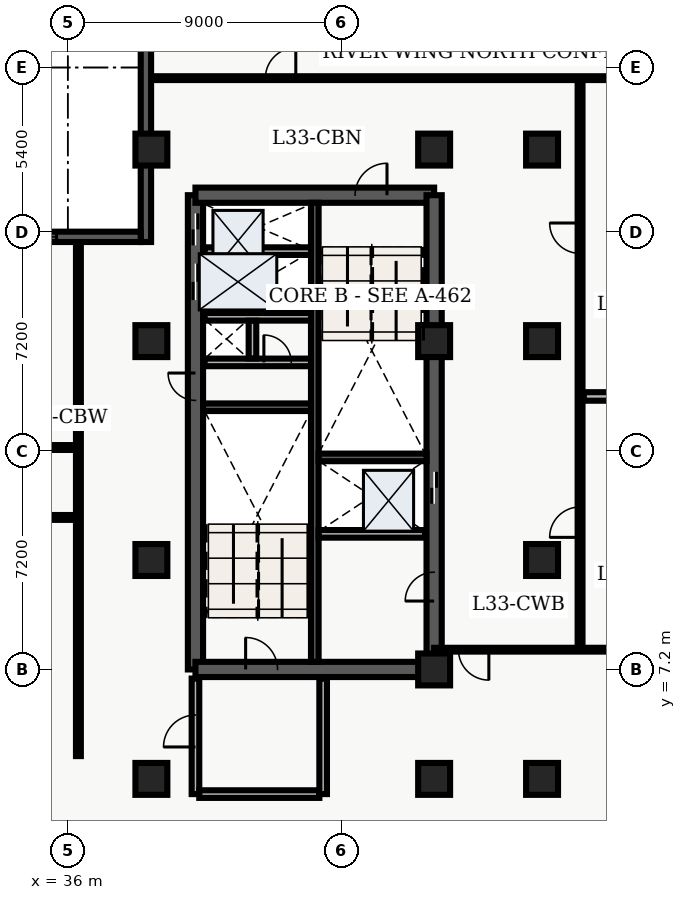
"""IFC4 building model, lengths in metres.
Left out: names, types, materials, properties, quantities, classifications, styles, units other than length and angle.
Written with IfcOpenShell. Run it as: python <this file> out.ifc"""

import sys

from ifc_helpers import new_model, entity, si_unit, converted_unit, direction, frame, origin_with_axes, origin_2d_with_axis, place, context, subcontext, project, spatial, polyline, rectangle, outline, extrude, element, fill, save


model = new_model("IFC4")
c1 = context("Model", 3, precision=1e-05, world=origin_with_axes(), true_north=direction((0.0, 1.0)))
c2 = subcontext(c1, "Body", "Model", "MODEL_VIEW")
j1 = project(units=[si_unit("LENGTHUNIT", "METRE"), converted_unit("PLANEANGLEUNIT", "DEGREE", entity("IfcPlaneAngleMeasure", 0.017), si_unit("PLANEANGLEUNIT", "RADIAN"), dimensions=[0, 0, 0, 0, 0, 0, 0])], contexts=[c1])
p1 = place(None, origin_with_axes())
s1 = spatial("IfcSite", under=j1, at=p1, CompositionType="ELEMENT")
p2 = place(p1, origin_with_axes())
s2 = spatial("IfcBuilding", under=s1, at=p2, CompositionType="ELEMENT")
p3 = place(p2, frame((0.0, 0.0, 136.8), z_axis=(0.0, 0.0, 1.0), x_axis=(1.0, 0.0, 0.0)))
s3 = spatial("IfcBuildingStorey", under=s2, at=p3, CompositionType="ELEMENT", Elevation=136.8)
p4 = place(p3, frame((40.2, 7.2, 0.0), z_axis=(0.0, 0.0, 1.0), x_axis=(0.0, 1.0, 0.0)))
e1 = element("IfcWall", 1, at=p4, inside=s3, PredefinedType="SHEAR", context=c2, shape_type="SweptSolid", body=[
    extrude(outline(polyline([(0.0, -0.25), (15.6, -0.25), (15.6, 0.25), (0.0, 0.25), (0.0, -0.25)])), origin_with_axes(), (0.0, 0.0, 1.0), 3.66),
])
p5 = place(p4, frame((14.475, 0.0, 0.0), z_axis=(0.0, 0.0, 1.0), x_axis=(1.0, 0.0, 0.0)))
e2 = element("IfcOpeningElement", 2, at=p5, cuts=e1, PredefinedType="OPENING", context=c2, shape_type="SweptSolid", body=[
    extrude(rectangle(XDim=1.05, YDim=0.52, at=origin_2d_with_axis()), origin_with_axes(), (0.0, 0.0, 1.0), 2.15),
])
p6 = place(p4, frame((12.75, 0.0, 0.0), z_axis=(0.0, 0.0, 1.0), x_axis=(1.0, 0.0, 0.0)))
e3 = element("IfcOpeningElement", 3, at=p6, cuts=e1, PredefinedType="OPENING", context=c2, shape_type="SweptSolid", body=[
    extrude(rectangle(XDim=1.2, YDim=0.52, at=origin_2d_with_axis()), origin_with_axes(), (0.0, 0.0, 1.0), 2.15),
])
p7 = place(p4, frame((9.3, 0.0, 0.0), z_axis=(0.0, 0.0, 1.0), x_axis=(1.0, 0.0, 0.0)))
e4 = element("IfcOpeningElement", 4, at=p7, cuts=e1, PredefinedType="OPENING", context=c2, shape_type="SweptSolid", body=[
    extrude(rectangle(XDim=0.9, YDim=0.52, at=origin_2d_with_axis()), origin_with_axes(), (0.0, 0.0, 1.0), 2.15),
])
p8 = place(p3, frame((40.2, 7.2, 0.0), z_axis=(0.0, 0.0, 1.0), x_axis=(1.0, 0.0, 0.0)))
e5 = element("IfcWall", 5, at=p8, inside=s3, PredefinedType="SHEAR", context=c2, shape_type="SweptSolid", body=[
    extrude(outline(polyline([(0.0, -0.25), (7.85, -0.25), (7.85, 0.25), (0.0, 0.25), (0.0, -0.25)])), origin_with_axes(), (0.0, 0.0, 1.0), 3.66),
])
p9 = place(p8, frame((2.175, 0.0, 0.0), z_axis=(0.0, 0.0, 1.0), x_axis=(1.0, 0.0, 0.0)))
e6 = element("IfcOpeningElement", 6, at=p9, cuts=e5, PredefinedType="OPENING", context=c2, shape_type="SweptSolid", body=[
    extrude(rectangle(XDim=1.05, YDim=0.52, at=origin_2d_with_axis()), origin_with_axes(), (0.0, 0.0, 1.0), 2.15),
])
p10 = place(p3, frame((40.2, 22.8, 0.0), z_axis=(0.0, 0.0, 1.0), x_axis=(1.0, 0.0, 0.0)))
e7 = element("IfcWall", 7, at=p10, inside=s3, PredefinedType="SHEAR", context=c2, shape_type="SweptSolid", body=[
    extrude(outline(polyline([(0.0, -0.25), (7.85, -0.25), (7.85, 0.25), (0.0, 0.25), (0.0, -0.25)])), origin_with_axes(), (0.0, 0.0, 1.0), 3.66),
])
p11 = place(p10, frame((5.775, 0.0, 0.0), z_axis=(0.0, 0.0, 1.0), x_axis=(1.0, 0.0, 0.0)))
e8 = element("IfcOpeningElement", 8, at=p11, cuts=e7, PredefinedType="OPENING", context=c2, shape_type="SweptSolid", body=[
    extrude(rectangle(XDim=1.05, YDim=0.52, at=origin_2d_with_axis()), origin_with_axes(), (0.0, 0.0, 1.0), 2.15),
])
p12 = place(p3, frame((48.05, 7.2, 0.0), z_axis=(0.0, 0.0, 1.0), x_axis=(0.0, 1.0, 0.0)))
e9 = element("IfcWall", 9, at=p12, inside=s3, PredefinedType="SHEAR", context=c2, shape_type="SweptSolid", body=[
    extrude(outline(polyline([(0.0, -0.25), (15.6, -0.25), (15.6, 0.25), (0.0, 0.25), (0.0, -0.25)])), origin_with_axes(), (0.0, 0.0, 1.0), 3.66),
])
p13 = place(p12, frame((5.975, 0.0, 0.0), z_axis=(0.0, 0.0, 1.0), x_axis=(1.0, 0.0, 0.0)))
e10 = element("IfcOpeningElement", 10, at=p13, cuts=e9, PredefinedType="OPENING", context=c2, shape_type="SweptSolid", body=[
    extrude(rectangle(XDim=1.05, YDim=0.52, at=origin_2d_with_axis()), origin_with_axes(), (0.0, 0.0, 1.0), 2.15),
])
p14 = place(p12, frame((2.725, 0.0, 0.0), z_axis=(0.0, 0.0, 1.0), x_axis=(1.0, 0.0, 0.0)))
e11 = element("IfcOpeningElement", 11, at=p14, cuts=e9, PredefinedType="OPENING", context=c2, shape_type="SweptSolid", body=[
    extrude(rectangle(XDim=0.95, YDim=0.52, at=origin_2d_with_axis()), origin_with_axes(), (0.0, 0.0, 1.0), 2.15),
])
p15 = place(p3, frame((44.125, 7.45, 0.0), z_axis=(0.0, 0.0, 1.0), x_axis=(0.0, 1.0, 0.0)))
e12 = element("IfcWall", 12, at=p15, inside=s3, PredefinedType="SHEAR", context=c2, shape_type="SweptSolid", body=[
    extrude(outline(polyline([(0.0, -0.125), (15.1, -0.125), (15.1, 0.125), (0.0, 0.125), (0.0, -0.125)])), origin_with_axes(), (0.0, 0.0, 1.0), 3.66),
])
for number, where, z_axis, x_axis in (
    (13, (40.45, 15.825, 0.0), (0.0, 0.0, 1.0), (1.0, 0.0, 0.0)),
    (14, (44.25, 14.175, 0.0), (0.0, 0.0, 1.0), (1.0, 0.0, 0.0)),
):
    element("IfcWall", number, at=place(p3, frame(where, z_axis=z_axis, x_axis=x_axis)), inside=s3, PredefinedType="SHEAR", context=c2, shape_type="SweptSolid", body=[
        extrude(outline(polyline([(0.0, -0.125), (3.55, -0.125), (3.55, 0.125), (0.0, 0.125), (0.0, -0.125)])), origin_with_axes(), (0.0, 0.0, 1.0), 3.66),
    ])
p16 = place(p3, frame((40.5, 17.3, 0.0), z_axis=(0.0, 0.0, 1.0), x_axis=(1.0, 0.0, 0.0)))
e15 = element("IfcWall", 15, at=p16, inside=s3, PredefinedType="SOLIDWALL", context=c2, shape_type="SweptSolid", body=[
    extrude(outline(polyline([(0.0, -0.125), (3.5, -0.125), (3.5, 0.125), (0.0, 0.125), (0.0, -0.125)])), origin_with_axes(), (0.0, 0.0, 1.0), 2.7),
])
p17 = place(p16, frame((2.4, 0.0, 0.0), z_axis=(0.0, 0.0, 1.0), x_axis=(1.0, 0.0, 0.0)))
e16 = element("IfcOpeningElement", 16, at=p17, cuts=e15, PredefinedType="OPENING", context=c2, shape_type="SweptSolid", body=[
    extrude(rectangle(XDim=0.9, YDim=0.27, at=origin_2d_with_axis()), origin_with_axes(), (0.0, 0.0, 1.0), 2.15),
])
p18 = place(p3, frame((40.5, 18.8, 0.0), z_axis=(0.0, 0.0, 1.0), x_axis=(1.0, 0.0, 0.0)))
e17 = element("IfcWall", 17, at=p18, inside=s3, PredefinedType="SOLIDWALL", context=c2, shape_type="SweptSolid", body=[
    extrude(outline(polyline([(0.0, -0.125), (3.5, -0.125), (3.5, 0.125), (0.0, 0.125), (0.0, -0.125)])), origin_with_axes(), (0.0, 0.0, 1.0), 2.7),
])
p19 = place(p3, frame((42.075, 17.43, 0.0), z_axis=(0.0, 0.0, 1.0), x_axis=(0.0, 1.0, 0.0)))
e18 = element("IfcWall", 18, at=p19, inside=s3, PredefinedType="SOLIDWALL", context=c2, shape_type="SweptSolid", body=[
    extrude(outline(polyline([(0.0, -0.125), (1.24, -0.125), (1.24, 0.125), (0.0, 0.125), (0.0, -0.125)])), origin_with_axes(), (0.0, 0.0, 1.0), 2.7),
])
p20 = place(p3, frame((40.2, 3.1, 0.0), z_axis=(0.0, 0.0, 1.0), x_axis=(0.0, 1.0, 0.0)))
e19 = element("IfcWall", 19, at=p20, inside=s3, PredefinedType="SOLIDWALL", context=c2, shape_type="SweptSolid", body=[
    extrude(outline(polyline([(0.0, -0.125), (3.8, -0.125), (3.8, 0.125), (0.0, 0.125), (0.0, -0.125)])), origin_with_axes(), (0.0, 0.0, 1.0), 2.7),
])
p21 = place(p20, frame((2.075, 0.0, 0.0), z_axis=(0.0, 0.0, 1.0), x_axis=(1.0, 0.0, 0.0)))
e20 = element("IfcOpeningElement", 20, at=p21, cuts=e19, PredefinedType="OPENING", context=c2, shape_type="SweptSolid", body=[
    extrude(rectangle(XDim=1.05, YDim=0.27, at=origin_2d_with_axis()), origin_with_axes(), (0.0, 0.0, 1.0), 2.15),
])
p22 = place(p3, frame((40.325, 3.1, 0.0), z_axis=(0.0, 0.0, 1.0), x_axis=(1.0, 0.0, 0.0)))
e21 = element("IfcWall", 21, at=p22, inside=s3, PredefinedType="SOLIDWALL", context=c2, shape_type="SweptSolid", body=[
    extrude(outline(polyline([(0.0, -0.125), (3.95, -0.125), (3.95, 0.125), (0.0, 0.125), (0.0, -0.125)])), origin_with_axes(), (0.0, 0.0, 1.0), 2.7),
])
p23 = place(p3, frame((44.4, 3.1, 0.0), z_axis=(0.0, 0.0, 1.0), x_axis=(0.0, 1.0, 0.0)))
e22 = element("IfcWall", 22, at=p23, inside=s3, PredefinedType="SOLIDWALL", context=c2, shape_type="SweptSolid", body=[
    extrude(outline(polyline([(0.0, -0.125), (3.8, -0.125), (3.8, 0.125), (0.0, 0.125), (0.0, -0.125)])), origin_with_axes(), (0.0, 0.0, 1.0), 2.7),
])
for number, where, z_axis, x_axis in (
    (23, (38.75, 3.6, 0.0), (0.0, 0.0, 1.0), (1.0, 0.0, 0.0)),
    (24, (38.75, 10.8, 0.0), (0.0, 0.0, 1.0), (1.0, 0.0, 0.0)),
    (25, (38.75, 18.0, 0.0), (0.0, 0.0, 1.0), (1.0, 0.0, 0.0)),
    (26, (38.75, 24.3, 0.0), (0.0, 0.0, 1.0), (1.0, 0.0, 0.0)),
    (27, (48.05, 3.6, 0.0), (0.0, 0.0, 1.0), (1.0, 0.0, 0.0)),
    (28, (48.05, 7.2, 0.0), (0.0, 0.0, 1.0), (1.0, 0.0, 0.0)),
    (29, (48.05, 18.0, 0.0), (0.0, 0.0, 1.0), (1.0, 0.0, 0.0)),
    (30, (48.05, 24.3, 0.0), (0.0, 0.0, 1.0), (1.0, 0.0, 0.0)),
    (31, (51.6, 3.6, 0.0), (0.0, 0.0, 1.0), (1.0, 0.0, 0.0)),
    (32, (51.6, 10.8, 0.0), (0.0, 0.0, 1.0), (1.0, 0.0, 0.0)),
    (33, (51.6, 18.0, 0.0), (0.0, 0.0, 1.0), (1.0, 0.0, 0.0)),
    (34, (51.6, 24.3, 0.0), (0.0, 0.0, 1.0), (1.0, 0.0, 0.0)),
):
    element("IfcColumn", number, at=place(p3, frame(where, z_axis=z_axis, x_axis=x_axis)), inside=s3, PredefinedType="COLUMN", context=c2, shape_type="SweptSolid", body=[
        extrude(rectangle(XDim=1.05, YDim=1.05, at=origin_2d_with_axis()), origin_with_axes(), (0.0, 0.0, 1.0), 3.9),
    ])
for number, where, z_axis, x_axis in (
    (35, (40.5, 20.96, 0.0), (0.0, 0.0, 1.0), (1.0, 0.0, 0.0)),
    (36, (44.25, 11.66, 0.0), (0.0, 0.0, 1.0), (1.0, 0.0, 0.0)),
):
    element("IfcWall", number, at=place(p3, frame(where, z_axis=z_axis, x_axis=x_axis)), inside=s3, PredefinedType="SOLIDWALL", context=c2, shape_type="SweptSolid", body=[
        extrude(outline(polyline([(0.0, -0.125), (3.5, -0.125), (3.5, 0.125), (0.0, 0.125), (0.0, -0.125)])), origin_with_axes(), (0.0, 0.0, 1.0), 2.7),
    ])
p24 = place(p3, frame((21.15, 12.2, 0.0), z_axis=(0.0, 0.0, 1.0), x_axis=(1.0, 0.0, 0.0)))
e37 = element("IfcWall", 37, at=p24, inside=s3, PredefinedType="PARTITIONING", context=c2, shape_type="SweptSolid", body=[
    extrude(outline(polyline([(0.0, -0.08), (15.2, -0.08), (15.2, 0.08), (0.0, 0.08), (0.0, -0.08)])), origin_with_axes(), (0.0, 0.0, 1.0), 2.7),
])
p25 = place(p24, frame((3.315, 0.0, 0.0), z_axis=(0.0, 0.0, 1.0), x_axis=(1.0, 0.0, 0.0)))
e38 = element("IfcOpeningElement", 38, at=p25, cuts=e37, PredefinedType="OPENING", context=c2, shape_type="SweptSolid", body=[
    extrude(rectangle(XDim=1.0, YDim=0.18, at=origin_2d_with_axis()), origin_with_axes(), (0.0, 0.0, 1.0), 2.15),
])
p26 = place(p24, frame((7.624, 0.0, 0.0), z_axis=(0.0, 0.0, 1.0), x_axis=(1.0, 0.0, 0.0)))
e39 = element("IfcOpeningElement", 39, at=p26, cuts=e37, PredefinedType="OPENING", context=c2, shape_type="SweptSolid", body=[
    extrude(rectangle(XDim=1.0, YDim=0.18, at=origin_2d_with_axis()), origin_with_axes(), (0.0, 0.0, 1.0), 2.15),
])
p27 = place(p24, frame((10.288, 0.0, 0.0), z_axis=(0.0, 0.0, 1.0), x_axis=(1.0, 0.0, 0.0)))
e40 = element("IfcOpeningElement", 40, at=p27, cuts=e37, PredefinedType="OPENING", context=c2, shape_type="SweptSolid", body=[
    extrude(rectangle(XDim=1.0, YDim=0.18, at=origin_2d_with_axis()), origin_with_axes(), (0.0, 0.0, 1.0), 2.15),
])
p28 = place(p24, frame((13.169, 0.0, 0.0), z_axis=(0.0, 0.0, 1.0), x_axis=(1.0, 0.0, 0.0)))
e41 = element("IfcOpeningElement", 41, at=p28, cuts=e37, PredefinedType="OPENING", context=c2, shape_type="SweptSolid", body=[
    extrude(rectangle(XDim=1.0, YDim=0.18, at=origin_2d_with_axis()), origin_with_axes(), (0.0, 0.0, 1.0), 2.15),
])
p29 = place(p3, frame((21.15, 14.5, 0.0), z_axis=(0.0, 0.0, 1.0), x_axis=(1.0, 0.0, 0.0)))
e42 = element("IfcWall", 42, at=p29, inside=s3, PredefinedType="PARTITIONING", context=c2, shape_type="SweptSolid", body=[
    extrude(outline(polyline([(0.0, -0.08), (15.2, -0.08), (15.2, 0.08), (0.0, 0.08), (0.0, -0.08)])), origin_with_axes(), (0.0, 0.0, 1.0), 2.7),
])
p30 = place(p29, frame((7.65, 0.0, 0.0), z_axis=(0.0, 0.0, 1.0), x_axis=(1.0, 0.0, 0.0)))
e43 = element("IfcOpeningElement", 43, at=p30, cuts=e42, PredefinedType="OPENING", context=c2, shape_type="SweptSolid", body=[
    extrude(rectangle(XDim=1.2, YDim=0.18, at=origin_2d_with_axis()), origin_with_axes(), (0.0, 0.0, 1.0), 2.2),
])
p31 = place(p3, frame((36.35, 4.35, 0.0), z_axis=(0.0, 0.0, 1.0), x_axis=(0.0, 1.0, 0.0)))
e44 = element("IfcWall", 44, at=p31, inside=s3, PredefinedType="PARTITIONING", context=c2, shape_type="SweptSolid", body=[
    extrude(outline(polyline([(0.0, -0.08), (16.95, -0.08), (16.95, 0.08), (0.0, 0.08), (0.0, -0.08)])), origin_with_axes(), (0.0, 0.0, 1.0), 2.7),
])
p32 = place(p3, frame((52.85, 7.85, 0.0), z_axis=(0.0, 0.0, 1.0), x_axis=(0.0, 1.0, 0.0)))
e45 = element("IfcWall", 45, at=p32, inside=s3, PredefinedType="PARTITIONING", context=c2, shape_type="SweptSolid", body=[
    extrude(outline(polyline([(0.0, -0.08), (18.8, -0.08), (18.8, 0.08), (0.0, 0.08), (0.0, -0.08)])), origin_with_axes(), (0.0, 0.0, 1.0), 2.7),
])
p33 = place(p32, frame((4.195, 0.0, 0.0), z_axis=(0.0, 0.0, 1.0), x_axis=(1.0, 0.0, 0.0)))
e46 = element("IfcOpeningElement", 46, at=p33, cuts=e45, PredefinedType="OPENING", context=c2, shape_type="SweptSolid", body=[
    extrude(rectangle(XDim=1.0, YDim=0.18, at=origin_2d_with_axis()), origin_with_axes(), (0.0, 0.0, 1.0), 2.15),
])
p34 = place(p32, frame((13.535, 0.0, 0.0), z_axis=(0.0, 0.0, 1.0), x_axis=(1.0, 0.0, 0.0)))
e47 = element("IfcOpeningElement", 47, at=p34, cuts=e45, PredefinedType="OPENING", context=c2, shape_type="SweptSolid", body=[
    extrude(rectangle(XDim=1.0, YDim=0.18, at=origin_2d_with_axis()), origin_with_axes(), (0.0, 0.0, 1.0), 2.15),
])
p35 = place(p3, frame((59.665, 7.85, 0.0), z_axis=(0.0, 0.0, 1.0), x_axis=(-1.0, 0.0, 0.0)))
e48 = element("IfcWall", 48, at=p35, inside=s3, PredefinedType="PARTITIONING", context=c2, shape_type="SweptSolid", body=[
    extrude(outline(polyline([(0.0, -0.062), (11.615, -0.062), (11.615, 0.062), (0.0, 0.062), (0.0, -0.062)])), origin_with_axes(), (0.0, 0.0, 1.0), 2.7),
])
p36 = place(p35, frame((10.315, 0.0, 0.0), z_axis=(0.0, 0.0, 1.0), x_axis=(1.0, 0.0, 0.0)))
e49 = element("IfcOpeningElement", 49, at=p36, cuts=e48, PredefinedType="OPENING", context=c2, shape_type="SweptSolid", body=[
    extrude(rectangle(XDim=1.0, YDim=0.145, at=origin_2d_with_axis()), origin_with_axes(), (0.0, 0.0, 1.0), 2.15),
])
p37 = place(p3, frame((38.735, 26.65, 0.0), z_axis=(0.0, 0.0, 1.0), x_axis=(1.0, 0.0, 0.0)))
e50 = element("IfcWall", 50, at=p37, inside=s3, PredefinedType="PARTITIONING", context=c2, shape_type="SweptSolid", body=[
    extrude(outline(polyline([(0.0, -0.062), (20.905, -0.062), (20.905, 0.062), (0.0, 0.062), (0.0, -0.062)])), origin_with_axes(), (0.0, 0.0, 1.0), 2.7),
])
p38 = place(p37, frame((4.265, 0.0, 0.0), z_axis=(0.0, 0.0, 1.0), x_axis=(1.0, 0.0, 0.0)))
e51 = element("IfcOpeningElement", 51, at=p38, cuts=e50, PredefinedType="OPENING", context=c2, shape_type="SweptSolid", body=[
    extrude(rectangle(XDim=1.0, YDim=0.145, at=origin_2d_with_axis()), origin_with_axes(), (0.0, 0.0, 1.0), 2.15),
])
p39 = place(p3, frame((52.97, 16.18, 0.0), z_axis=(0.0, 0.0, 1.0), x_axis=(1.0, 0.0, 0.0)))
e52 = element("IfcWall", 52, at=p39, inside=s3, PredefinedType="PARTITIONING", context=c2, shape_type="SweptSolid", body=[
    extrude(outline(polyline([(0.0, -0.14), (6.695, -0.14), (6.695, 0.14), (0.0, 0.14), (0.0, -0.14)])), origin_with_axes(), (0.0, 0.0, 1.0), 2.7),
])
p40 = place(p3, frame((38.57, 21.26, 0.0), z_axis=(0.0, 0.0, 1.0), x_axis=(0.0, 1.0, 0.0)))
e53 = element("IfcWall", 53, at=p40, inside=s3, PredefinedType="SOLIDWALL", context=c2, shape_type="SweptSolid", body=[
    extrude(outline(polyline([(0.0, -0.17), (7.54, -0.17), (7.54, 0.17), (0.0, 0.17), (0.0, -0.17)])), origin_with_axes(), (0.0, 0.0, 1.0), 3.66),
])
p41 = place(p3, frame((21.485, 21.43, 0.0), z_axis=(0.0, 0.0, 1.0), x_axis=(1.0, 0.0, 0.0)))
e54 = element("IfcWall", 54, at=p41, inside=s3, PredefinedType="SOLIDWALL", context=c2, shape_type="SweptSolid", body=[
    extrude(outline(polyline([(0.0, -0.17), (16.915, -0.17), (16.915, 0.17), (0.0, 0.17), (0.0, -0.17)])), origin_with_axes(), (0.0, 0.0, 1.0), 3.66),
])
p42 = place(p41, frame((3.219, 0.0, 0.45), z_axis=(0.0, 0.0, 1.0), x_axis=(1.0, 0.0, 0.0)))
e55 = element("IfcOpeningElement", 55, at=p42, cuts=e54, PredefinedType="OPENING", context=c2, shape_type="SweptSolid", body=[
    extrude(rectangle(XDim=1.8, YDim=0.36, at=origin_2d_with_axis()), origin_with_axes(), (0.0, 0.0, 1.0), 2.1),
])
p43 = place(p41, frame((8.457, 0.0, 0.45), z_axis=(0.0, 0.0, 1.0), x_axis=(1.0, 0.0, 0.0)))
e56 = element("IfcOpeningElement", 56, at=p43, cuts=e54, PredefinedType="OPENING", context=c2, shape_type="SweptSolid", body=[
    extrude(rectangle(XDim=1.8, YDim=0.36, at=origin_2d_with_axis()), origin_with_axes(), (0.0, 0.0, 1.0), 2.1),
])
p44 = place(p41, frame((13.246, 0.0, 0.45), z_axis=(0.0, 0.0, 1.0), x_axis=(1.0, 0.0, 0.0)))
e57 = element("IfcOpeningElement", 57, at=p44, cuts=e54, PredefinedType="OPENING", context=c2, shape_type="SweptSolid", body=[
    extrude(rectangle(XDim=1.8, YDim=0.36, at=origin_2d_with_axis()), origin_with_axes(), (0.0, 0.0, 1.0), 2.1),
])
p45 = place(p12, frame((5.975, 0.0, 0.0), z_axis=(0.0, 0.0, 1.0), x_axis=(1.0, 0.0, 0.0)))
e58 = element("IfcDoor", 58, at=p45, inside=s3, OperationType="SLIDING_TO_LEFT", PredefinedType="DOOR", context=c2, shape_type="SweptSolid", body=[
    extrude(rectangle(XDim=1.05, YDim=0.09, at=origin_2d_with_axis()), origin_with_axes(), (0.0, 0.0, 1.0), 2.15),
])
fill(e10, e58)
p46 = place(p4, frame((14.475, 0.0, 0.0), z_axis=(0.0, 0.0, 1.0), x_axis=(1.0, 0.0, 0.0)))
e59 = element("IfcDoor", 59, at=p46, inside=s3, OperationType="SLIDING_TO_RIGHT", PredefinedType="DOOR", context=c2, shape_type="SweptSolid", body=[
    extrude(rectangle(XDim=1.05, YDim=0.09, at=origin_2d_with_axis()), origin_with_axes(), (0.0, 0.0, 1.0), 2.15),
])
fill(e2, e59)
p47 = place(p4, frame((12.75, 0.0, 0.0), z_axis=(0.0, 0.0, 1.0), x_axis=(1.0, 0.0, 0.0)))
e60 = element("IfcDoor", 60, at=p47, inside=s3, OperationType="DOUBLE_DOOR_SLIDING", PredefinedType="DOOR", context=c2, shape_type="SweptSolid", body=[
    extrude(rectangle(XDim=1.2, YDim=0.09, at=origin_2d_with_axis()), origin_with_axes(), (0.0, 0.0, 1.0), 2.15),
])
fill(e3, e60)
p48 = place(p4, frame((9.3, 0.0, 0.0), z_axis=(0.0, 0.0, 1.0), x_axis=(1.0, 0.0, 0.0)))
e61 = element("IfcDoor", 61, at=p48, inside=s3, OperationType="SINGLE_SWING_RIGHT", PredefinedType="DOOR", context=c2, shape_type="SweptSolid", body=[
    extrude(rectangle(XDim=0.9, YDim=0.09, at=origin_2d_with_axis()), origin_with_axes(), (0.0, 0.0, 1.0), 2.15),
])
fill(e4, e61)
p49 = place(p16, frame((2.4, 0.0, 0.0), z_axis=(0.0, 0.0, 1.0), x_axis=(1.0, 0.0, 0.0)))
e62 = element("IfcDoor", 62, at=p49, inside=s3, OperationType="SINGLE_SWING_LEFT", PredefinedType="DOOR", context=c2, shape_type="SweptSolid", body=[
    extrude(rectangle(XDim=0.9, YDim=0.09, at=origin_2d_with_axis()), origin_with_axes(), (0.0, 0.0, 1.0), 2.15),
])
fill(e16, e62)
p50 = place(p8, frame((2.175, 0.0, 0.0), z_axis=(0.0, 0.0, 1.0), x_axis=(1.0, 0.0, 0.0)))
e63 = element("IfcDoor", 63, at=p50, inside=s3, OperationType="SINGLE_SWING_LEFT", PredefinedType="DOOR", context=c2, shape_type="SweptSolid", body=[
    extrude(rectangle(XDim=1.05, YDim=0.09, at=origin_2d_with_axis()), origin_with_axes(), (0.0, 0.0, 1.0), 2.15),
])
fill(e6, e63)
p51 = place(p10, frame((5.775, 0.0, 0.0), z_axis=(0.0, 0.0, 1.0), x_axis=(1.0, 0.0, 0.0)))
e64 = element("IfcDoor", 64, at=p51, inside=s3, OperationType="SINGLE_SWING_RIGHT", PredefinedType="DOOR", context=c2, shape_type="SweptSolid", body=[
    extrude(rectangle(XDim=1.05, YDim=0.09, at=origin_2d_with_axis()), origin_with_axes(), (0.0, 0.0, 1.0), 2.15),
])
fill(e8, e64)
p52 = place(p20, frame((2.075, 0.0, 0.0), z_axis=(0.0, 0.0, 1.0), x_axis=(1.0, 0.0, 0.0)))
e65 = element("IfcDoor", 65, at=p52, inside=s3, OperationType="SINGLE_SWING_LEFT", PredefinedType="DOOR", context=c2, shape_type="SweptSolid", body=[
    extrude(rectangle(XDim=1.05, YDim=0.09, at=origin_2d_with_axis()), origin_with_axes(), (0.0, 0.0, 1.0), 2.15),
])
fill(e20, e65)
p53 = place(p12, frame((2.725, 0.0, 0.0), z_axis=(0.0, 0.0, 1.0), x_axis=(1.0, 0.0, 0.0)))
e66 = element("IfcDoor", 66, at=p53, inside=s3, OperationType="SINGLE_SWING_LEFT", PredefinedType="DOOR", context=c2, shape_type="SweptSolid", body=[
    extrude(rectangle(XDim=0.95, YDim=0.09, at=origin_2d_with_axis()), origin_with_axes(), (0.0, 0.0, 1.0), 2.15),
])
fill(e11, e66)
p54 = place(p35, frame((10.315, 0.0, 0.0), z_axis=(0.0, 0.0, 1.0), x_axis=(1.0, 0.0, 0.0)))
e67 = element("IfcDoor", 67, at=p54, inside=s3, OperationType="SINGLE_SWING_LEFT", PredefinedType="DOOR", context=c2, shape_type="SweptSolid", body=[
    extrude(rectangle(XDim=1.0, YDim=0.075, at=origin_2d_with_axis()), origin_with_axes(), (0.0, 0.0, 1.0), 2.15),
])
fill(e49, e67)
p55 = place(p37, frame((4.265, 0.0, 0.0), z_axis=(0.0, 0.0, 1.0), x_axis=(1.0, 0.0, 0.0)))
e68 = element("IfcDoor", 68, at=p55, inside=s3, OperationType="SINGLE_SWING_RIGHT", PredefinedType="DOOR", context=c2, shape_type="SweptSolid", body=[
    extrude(rectangle(XDim=1.0, YDim=0.075, at=origin_2d_with_axis()), origin_with_axes(), (0.0, 0.0, 1.0), 2.15),
])
fill(e51, e68)
p56 = place(p32, frame((4.195, 0.0, 0.0), z_axis=(0.0, 0.0, 1.0), x_axis=(1.0, 0.0, 0.0)))
e69 = element("IfcDoor", 69, at=p56, inside=s3, OperationType="SINGLE_SWING_LEFT", PredefinedType="DOOR", context=c2, shape_type="SweptSolid", body=[
    extrude(rectangle(XDim=1.0, YDim=0.09, at=origin_2d_with_axis()), origin_with_axes(), (0.0, 0.0, 1.0), 2.15),
])
fill(e46, e69)
p57 = place(p32, frame((13.535, 0.0, 0.0), z_axis=(0.0, 0.0, 1.0), x_axis=(1.0, 0.0, 0.0)))
e70 = element("IfcDoor", 70, at=p57, inside=s3, OperationType="SINGLE_SWING_RIGHT", PredefinedType="DOOR", context=c2, shape_type="SweptSolid", body=[
    extrude(rectangle(XDim=1.0, YDim=0.09, at=origin_2d_with_axis()), origin_with_axes(), (0.0, 0.0, 1.0), 2.15),
])
fill(e47, e70)
p58 = place(p41, frame((13.246, 0.0, 0.45), z_axis=(0.0, 0.0, 1.0), x_axis=(1.0, 0.0, 0.0)))
e71 = element("IfcWindow", 71, at=p58, inside=s3, PredefinedType="WINDOW", context=c2, shape_type="SweptSolid", body=[
    extrude(rectangle(XDim=1.8, YDim=0.09, at=origin_2d_with_axis()), origin_with_axes(), (0.0, 0.0, 1.0), 2.1),
])
fill(e57, e71)
save(model, sys.argv[1])
